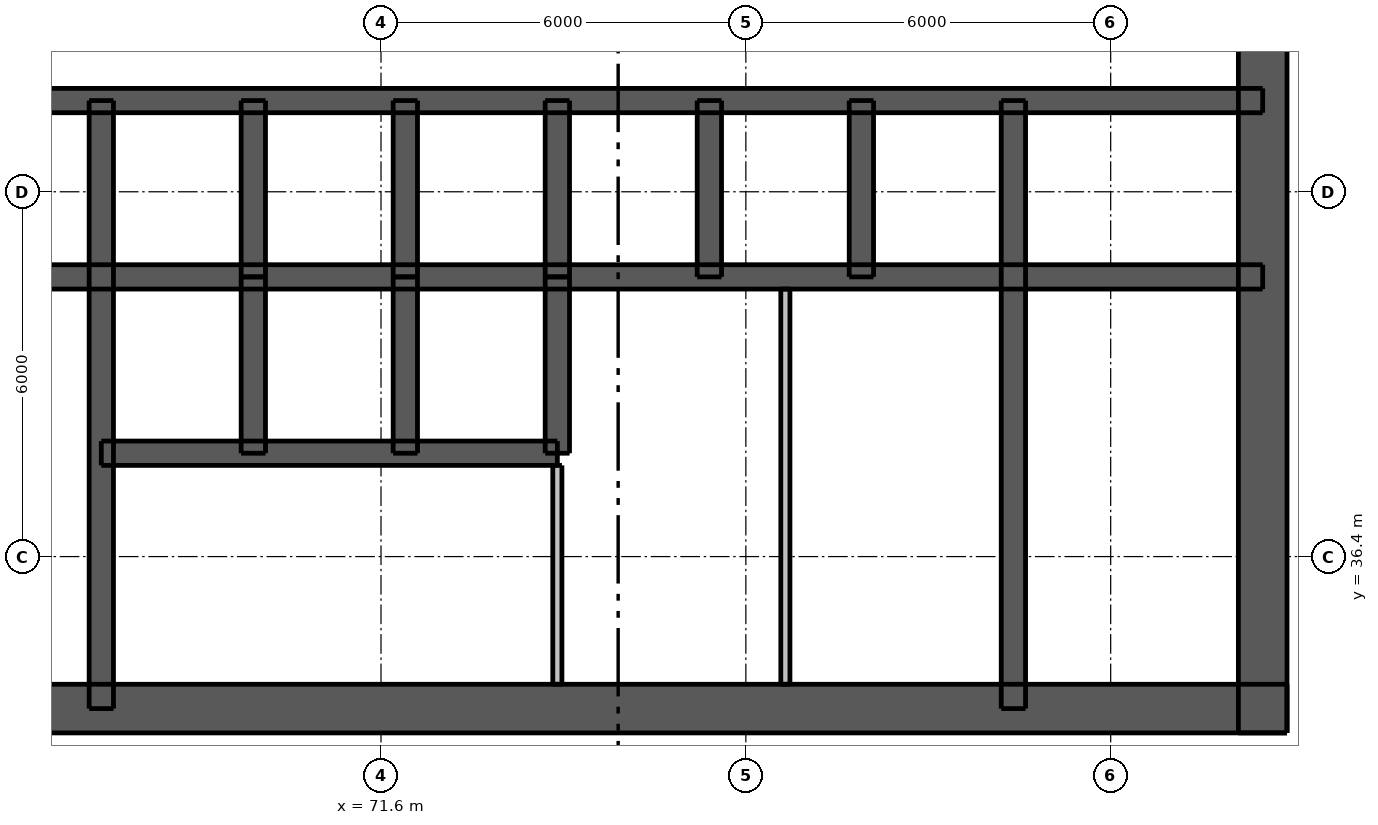
"""IFC4 building model, lengths in metres.
Left out: names, types, materials, properties, quantities, classifications, styles, units other than length and angle.
Written with IfcOpenShell. Run it as: python <this file> out.ifc"""

import sys

from ifc_helpers import new_model, si_unit, direction, frame, frame_2d, origin, place, context, subcontext, project, spatial, rectangle, extrude, element, fill, save


model = new_model("IFC4")
c1 = context("Model", 3, precision=1e-05, world=origin(), true_north=direction((0.0, 1.0)))
c2 = subcontext(c1, "Body", "Model", "MODEL_VIEW")
j1 = project(units=[si_unit("LENGTHUNIT", "METRE"), si_unit("PLANEANGLEUNIT", "RADIAN")], contexts=[c1])
p1 = place(None, origin())
s1 = spatial("IfcSite", under=j1, at=p1, CompositionType="ELEMENT")
p2 = place(p1, origin())
s2 = spatial("IfcBuilding", under=s1, at=p2, CompositionType="ELEMENT")
p3 = place(p2, frame((0.0, 0.0, 88.6)))
s3 = spatial("IfcBuildingStorey", under=s2, at=p3, CompositionType="ELEMENT", Elevation=88.6)
p4 = place(p3, frame((62.5, 33.9, 0.0), z_axis=(0.0, 0.0, 1.0), x_axis=(1.0, 0.0, 0.0)))
e1 = element("IfcWall", 1, at=p4, inside=s3, PredefinedType="SHEAR", context=c2, shape_type="SweptSolid", body=[
    extrude(rectangle(XDim=24.0, YDim=0.8, at=frame_2d((12.0, 0.0))), origin(), (0.0, 0.0, 1.0), 3.05),
])
p5 = place(p4, frame((2.0, 0.0, 0.0)))
e2 = element("IfcOpeningElement", 2, at=p5, cuts=e1, PredefinedType="OPENING", context=c2, shape_type="SweptSolid", body=[
    extrude(rectangle(XDim=1.1, YDim=2.1, at=frame_2d((0.55, 1.05))), frame((0.0, 0.41, 0.0), z_axis=(0.0, -1.0, 0.0), x_axis=(1.0, 0.0, 0.0)), (0.0, 0.0, 1.0), 0.82),
])
p6 = place(p4, frame((20.9, 0.0, 0.0)))
e3 = element("IfcOpeningElement", 3, at=p6, cuts=e1, PredefinedType="OPENING", context=c2, shape_type="SweptSolid", body=[
    extrude(rectangle(XDim=1.1, YDim=2.1, at=frame_2d((0.55, 1.05))), frame((0.0, 0.41, 0.0), z_axis=(0.0, -1.0, 0.0), x_axis=(1.0, 0.0, 0.0)), (0.0, 0.0, 1.0), 0.82),
])
p7 = place(p4, frame((8.0, 0.0, 0.0)))
e4 = element("IfcOpeningElement", 4, at=p7, cuts=e1, PredefinedType="OPENING", context=c2, shape_type="SweptSolid", body=[
    extrude(rectangle(XDim=1.1, YDim=2.1, at=frame_2d((0.55, 1.05))), frame((0.0, 0.41, 0.0), z_axis=(0.0, -1.0, 0.0), x_axis=(1.0, 0.0, 0.0)), (0.0, 0.0, 1.0), 0.82),
])
p8 = place(p4, frame((13.525, 0.0, 0.0)))
e5 = element("IfcOpeningElement", 5, at=p8, cuts=e1, PredefinedType="OPENING", context=c2, shape_type="SweptSolid", body=[
    extrude(rectangle(XDim=0.9, YDim=2.1, at=frame_2d((0.45, 1.05))), frame((0.0, 0.41, 0.0), z_axis=(0.0, -1.0, 0.0), x_axis=(1.0, 0.0, 0.0)), (0.0, 0.0, 1.0), 0.82),
])
p9 = place(p4, frame((17.075, 0.0, 0.0)))
e6 = element("IfcOpeningElement", 6, at=p9, cuts=e1, PredefinedType="OPENING", context=c2, shape_type="SweptSolid", body=[
    extrude(rectangle(XDim=0.9, YDim=2.1, at=frame_2d((0.45, 1.05))), frame((0.0, 0.41, 0.0), z_axis=(0.0, -1.0, 0.0), x_axis=(1.0, 0.0, 0.0)), (0.0, 0.0, 1.0), 0.82),
])
p10 = place(p3, frame((86.1, 33.5, 0.0), z_axis=(0.0, 0.0, 1.0), x_axis=(0.0, 1.0, 0.0)))
e7 = element("IfcWall", 7, at=p10, inside=s3, PredefinedType="SHEAR", context=c2, shape_type="SweptSolid", body=[
    extrude(rectangle(XDim=24.0, YDim=0.8, at=frame_2d((12.0, 0.0))), origin(), (0.0, 0.0, 1.0), 3.05),
])
p11 = place(p10, frame((11.2, 0.0, 0.0)))
e8 = element("IfcOpeningElement", 8, at=p11, cuts=e7, PredefinedType="OPENING", context=c2, shape_type="SweptSolid", body=[
    extrude(rectangle(XDim=1.6, YDim=2.1, at=frame_2d((0.8, 1.05))), frame((0.0, 0.41, 0.0), z_axis=(0.0, -1.0, 0.0), x_axis=(1.0, 0.0, 0.0)), (0.0, 0.0, 1.0), 0.82),
])
p12 = place(p3, frame((62.9, 41.0, 0.0), z_axis=(0.0, 0.0, 1.0), x_axis=(1.0, 0.0, 0.0)))
e9 = element("IfcWall", 9, at=p12, inside=s3, PredefinedType="SHEAR", context=c2, shape_type="SweptSolid", body=[
    extrude(rectangle(XDim=23.2, YDim=0.4, at=frame_2d((11.6, 0.0))), origin(), (0.0, 0.0, 1.0), 3.05),
])
p13 = place(p3, frame((62.9, 43.9, 0.0), z_axis=(0.0, 0.0, 1.0), x_axis=(1.0, 0.0, 0.0)))
e10 = element("IfcWall", 10, at=p13, inside=s3, PredefinedType="SHEAR", context=c2, shape_type="SweptSolid", body=[
    extrude(rectangle(XDim=23.2, YDim=0.4, at=frame_2d((11.6, 0.0))), origin(), (0.0, 0.0, 1.0), 3.05),
])
p14 = place(p13, frame((1.07, 0.0, 0.0)))
e11 = element("IfcOpeningElement", 11, at=p14, cuts=e10, PredefinedType="OPENING", context=c2, shape_type="SweptSolid", body=[
    extrude(rectangle(XDim=0.9, YDim=2.1, at=frame_2d((0.45, 1.05))), frame((0.0, 0.21, 0.0), z_axis=(0.0, -1.0, 0.0), x_axis=(1.0, 0.0, 0.0)), (0.0, 0.0, 1.0), 0.42),
])
p15 = place(p13, frame((2.87, 0.0, 0.0)))
e12 = element("IfcOpeningElement", 12, at=p15, cuts=e10, PredefinedType="OPENING", context=c2, shape_type="SweptSolid", body=[
    extrude(rectangle(XDim=0.8, YDim=2.1, at=frame_2d((0.4, 1.05))), frame((0.0, 0.21, 0.0), z_axis=(0.0, -1.0, 0.0), x_axis=(1.0, 0.0, 0.0)), (0.0, 0.0, 1.0), 0.42),
])
p16 = place(p13, frame((20.6, 0.0, 0.0)))
e13 = element("IfcOpeningElement", 13, at=p16, cuts=e10, PredefinedType="OPENING", context=c2, shape_type="SweptSolid", body=[
    extrude(rectangle(XDim=0.9, YDim=2.1, at=frame_2d((0.45, 1.05))), frame((0.0, 0.21, 0.0), z_axis=(0.0, -1.0, 0.0), x_axis=(1.0, 0.0, 0.0)), (0.0, 0.0, 1.0), 0.42),
])
p17 = place(p13, frame((4.8, 0.0, 0.0)))
e14 = element("IfcOpeningElement", 14, at=p17, cuts=e10, PredefinedType="OPENING", context=c2, shape_type="SweptSolid", body=[
    extrude(rectangle(XDim=1.1, YDim=2.1, at=frame_2d((0.55, 1.05))), frame((0.0, 0.21, 0.0), z_axis=(0.0, -1.0, 0.0), x_axis=(1.0, 0.0, 0.0)), (0.0, 0.0, 1.0), 0.42),
])
p18 = place(p13, frame((7.3, 0.0, 0.0)))
e15 = element("IfcOpeningElement", 15, at=p18, cuts=e10, PredefinedType="OPENING", context=c2, shape_type="SweptSolid", body=[
    extrude(rectangle(XDim=1.1, YDim=2.1, at=frame_2d((0.55, 1.05))), frame((0.0, 0.21, 0.0), z_axis=(0.0, -1.0, 0.0), x_axis=(1.0, 0.0, 0.0)), (0.0, 0.0, 1.0), 0.42),
])
p19 = place(p13, frame((9.8, 0.0, 0.0)))
e16 = element("IfcOpeningElement", 16, at=p19, cuts=e10, PredefinedType="OPENING", context=c2, shape_type="SweptSolid", body=[
    extrude(rectangle(XDim=1.1, YDim=2.1, at=frame_2d((0.55, 1.05))), frame((0.0, 0.21, 0.0), z_axis=(0.0, -1.0, 0.0), x_axis=(1.0, 0.0, 0.0)), (0.0, 0.0, 1.0), 0.42),
])
p20 = place(p13, frame((12.3, 0.0, 0.0)))
e17 = element("IfcOpeningElement", 17, at=p20, cuts=e10, PredefinedType="OPENING", context=c2, shape_type="SweptSolid", body=[
    extrude(rectangle(XDim=1.1, YDim=2.1, at=frame_2d((0.55, 1.05))), frame((0.0, 0.21, 0.0), z_axis=(0.0, -1.0, 0.0), x_axis=(1.0, 0.0, 0.0)), (0.0, 0.0, 1.0), 0.42),
])
p21 = place(p13, frame((14.8, 0.0, 0.0)))
e18 = element("IfcOpeningElement", 18, at=p21, cuts=e10, PredefinedType="OPENING", context=c2, shape_type="SweptSolid", body=[
    extrude(rectangle(XDim=1.1, YDim=2.1, at=frame_2d((0.55, 1.05))), frame((0.0, 0.21, 0.0), z_axis=(0.0, -1.0, 0.0), x_axis=(1.0, 0.0, 0.0)), (0.0, 0.0, 1.0), 0.42),
])
p22 = place(p13, frame((17.3, 0.0, 0.0)))
e19 = element("IfcOpeningElement", 19, at=p22, cuts=e10, PredefinedType="OPENING", context=c2, shape_type="SweptSolid", body=[
    extrude(rectangle(XDim=1.1, YDim=2.1, at=frame_2d((0.55, 1.05))), frame((0.0, 0.21, 0.0), z_axis=(0.0, -1.0, 0.0), x_axis=(1.0, 0.0, 0.0)), (0.0, 0.0, 1.0), 0.42),
])
p23 = place(p3, frame((67.0, 33.9, 0.0), z_axis=(0.0, 0.0, 1.0), x_axis=(0.0, 1.0, 0.0)))
e20 = element("IfcWall", 20, at=p23, inside=s3, PredefinedType="SHEAR", context=c2, shape_type="SweptSolid", body=[
    extrude(rectangle(XDim=10.0, YDim=0.4, at=frame_2d((5.0, 0.0))), origin(), (0.0, 0.0, 1.0), 3.05),
])
p24 = place(p23, frame((0.6, 0.0, 0.0)))
e21 = element("IfcOpeningElement", 21, at=p24, cuts=e20, PredefinedType="OPENING", context=c2, shape_type="SweptSolid", body=[
    extrude(rectangle(XDim=1.1, YDim=2.1, at=frame_2d((0.55, 1.05))), frame((0.0, 0.21, 0.0), z_axis=(0.0, -1.0, 0.0), x_axis=(1.0, 0.0, 0.0)), (0.0, 0.0, 1.0), 0.42),
])
p25 = place(p3, frame((82.0, 33.9, 0.0), z_axis=(0.0, 0.0, 1.0), x_axis=(0.0, 1.0, 0.0)))
e22 = element("IfcWall", 22, at=p25, inside=s3, PredefinedType="SHEAR", context=c2, shape_type="SweptSolid", body=[
    extrude(rectangle(XDim=10.0, YDim=0.4, at=frame_2d((5.0, 0.0))), origin(), (0.0, 0.0, 1.0), 3.05),
])
for number, where, z_axis, x_axis in (
    (23, (69.5, 41.0, 0.0), (0.0, 0.0, 1.0), (0.0, 1.0, 0.0)),
    (24, (72.0, 41.0, 0.0), (0.0, 0.0, 1.0), (0.0, 1.0, 0.0)),
    (25, (74.5, 41.0, 0.0), (0.0, 0.0, 1.0), (0.0, 1.0, 0.0)),
    (26, (77.0, 41.0, 0.0), (0.0, 0.0, 1.0), (0.0, 1.0, 0.0)),
    (27, (79.5, 41.0, 0.0), (0.0, 0.0, 1.0), (0.0, 1.0, 0.0)),
):
    element("IfcWall", number, at=place(p3, frame(where, z_axis=z_axis, x_axis=x_axis)), inside=s3, PredefinedType="SHEAR", context=c2, shape_type="SweptSolid", body=[
        extrude(rectangle(XDim=2.9, YDim=0.4, at=frame_2d((1.45, 0.0))), origin(), (0.0, 0.0, 1.0), 3.05),
    ])
p26 = place(p3, frame((67.0, 38.1, 0.0), z_axis=(0.0, 0.0, 1.0), x_axis=(1.0, 0.0, 0.0)))
e28 = element("IfcWall", 28, at=p26, inside=s3, PredefinedType="SHEAR", context=c2, shape_type="SweptSolid", body=[
    extrude(rectangle(XDim=7.5, YDim=0.4, at=frame_2d((3.75, 0.0))), origin(), (0.0, 0.0, 1.0), 3.05),
])
p27 = place(p26, frame((0.7, 0.0, 0.0)))
e29 = element("IfcOpeningElement", 29, at=p27, cuts=e28, PredefinedType="OPENING", context=c2, shape_type="SweptSolid", body=[
    extrude(rectangle(XDim=1.1, YDim=2.1, at=frame_2d((0.55, 1.05))), frame((0.0, 0.21, 0.0), z_axis=(0.0, -1.0, 0.0), x_axis=(1.0, 0.0, 0.0)), (0.0, 0.0, 1.0), 0.42),
])
p28 = place(p26, frame((3.2, 0.0, 0.0)))
e30 = element("IfcOpeningElement", 30, at=p28, cuts=e28, PredefinedType="OPENING", context=c2, shape_type="SweptSolid", body=[
    extrude(rectangle(XDim=1.1, YDim=2.1, at=frame_2d((0.55, 1.05))), frame((0.0, 0.21, 0.0), z_axis=(0.0, -1.0, 0.0), x_axis=(1.0, 0.0, 0.0)), (0.0, 0.0, 1.0), 0.42),
])
p29 = place(p26, frame((5.65, 0.0, 0.0)))
e31 = element("IfcOpeningElement", 31, at=p29, cuts=e28, PredefinedType="OPENING", context=c2, shape_type="SweptSolid", body=[
    extrude(rectangle(XDim=1.2, YDim=2.1, at=frame_2d((0.6, 1.05))), frame((0.0, 0.21, 0.0), z_axis=(0.0, -1.0, 0.0), x_axis=(1.0, 0.0, 0.0)), (0.0, 0.0, 1.0), 0.42),
])
for number, where, z_axis, x_axis in (
    (32, (69.5, 38.1, 0.0), (0.0, 0.0, 1.0), (0.0, 1.0, 0.0)),
    (33, (72.0, 38.1, 0.0), (0.0, 0.0, 1.0), (0.0, 1.0, 0.0)),
    (34, (74.5, 38.1, 0.0), (0.0, 0.0, 1.0), (0.0, 1.0, 0.0)),
):
    element("IfcWall", number, at=place(p3, frame(where, z_axis=z_axis, x_axis=x_axis)), inside=s3, PredefinedType="SHEAR", context=c2, shape_type="SweptSolid", body=[
        extrude(rectangle(XDim=2.9, YDim=0.4, at=frame_2d((1.45, 0.0))), origin(), (0.0, 0.0, 1.0), 3.05),
    ])
p30 = place(p3, frame((74.5, 34.3, 0.0), z_axis=(0.0, 0.0, 1.0), x_axis=(0.0, 1.0, 0.0)))
e35 = element("IfcWall", 35, at=p30, inside=s3, PredefinedType="PLUMBINGWALL", context=c2, shape_type="SweptSolid", body=[
    extrude(rectangle(XDim=3.6, YDim=0.15, at=frame_2d((1.8, 0.0))), origin(), (0.0, 0.0, 1.0), 3.05),
])
p31 = place(p3, frame((78.25, 34.3, 0.0), z_axis=(0.0, 0.0, 1.0), x_axis=(0.0, 1.0, 0.0)))
e36 = element("IfcWall", 36, at=p31, inside=s3, PredefinedType="PLUMBINGWALL", context=c2, shape_type="SweptSolid", body=[
    extrude(rectangle(XDim=6.5, YDim=0.15, at=frame_2d((3.25, 0.0))), origin(), (0.0, 0.0, 1.0), 3.05),
])
p32 = place(p6, origin())
e37 = element("IfcDoor", 37, at=p32, inside=s3, OperationType="SINGLE_SWING_RIGHT", PredefinedType="DOOR", context=c2, shape_type="SweptSolid", body=[
    extrude(rectangle(XDim=1.1, YDim=2.1, at=frame_2d((0.55, 1.05))), frame((0.0, 0.388, 0.0), z_axis=(0.0, -1.0, 0.0), x_axis=(1.0, 0.0, 0.0)), (0.0, 0.0, 1.0), 0.05),
])
fill(e3, e37)
p33 = place(p7, origin())
e38 = element("IfcDoor", 38, at=p33, inside=s3, OperationType="SINGLE_SWING_LEFT", PredefinedType="DOOR", context=c2, shape_type="SweptSolid", body=[
    extrude(rectangle(XDim=1.1, YDim=2.1, at=frame_2d((0.55, 1.05))), frame((0.0, 0.388, 0.0), z_axis=(0.0, -1.0, 0.0), x_axis=(1.0, 0.0, 0.0)), (0.0, 0.0, 1.0), 0.05),
])
fill(e4, e38)
p34 = place(p24, origin())
e39 = element("IfcDoor", 39, at=p34, inside=s3, OperationType="SINGLE_SWING_RIGHT", PredefinedType="DOOR", context=c2, shape_type="SweptSolid", body=[
    extrude(rectangle(XDim=1.1, YDim=2.1, at=frame_2d((0.55, 1.05))), frame((0.0, -0.138, 0.0), z_axis=(0.0, -1.0, 0.0), x_axis=(1.0, 0.0, 0.0)), (0.0, 0.0, 1.0), 0.05),
])
fill(e21, e39)
p35 = place(p8, origin())
e40 = element("IfcDoor", 40, at=p35, inside=s3, OperationType="SINGLE_SWING_LEFT", PredefinedType="DOOR", context=c2, shape_type="SweptSolid", body=[
    extrude(rectangle(XDim=0.9, YDim=2.1, at=frame_2d((0.45, 1.05))), frame((0.0, 0.388, 0.0), z_axis=(0.0, -1.0, 0.0), x_axis=(1.0, 0.0, 0.0)), (0.0, 0.0, 1.0), 0.05),
])
fill(e5, e40)
p36 = place(p9, origin())
e41 = element("IfcDoor", 41, at=p36, inside=s3, OperationType="SINGLE_SWING_LEFT", PredefinedType="DOOR", context=c2, shape_type="SweptSolid", body=[
    extrude(rectangle(XDim=0.9, YDim=2.1, at=frame_2d((0.45, 1.05))), frame((0.0, 0.388, 0.0), z_axis=(0.0, -1.0, 0.0), x_axis=(1.0, 0.0, 0.0)), (0.0, 0.0, 1.0), 0.05),
])
fill(e6, e41)
p37 = place(p15, origin())
e42 = element("IfcDoor", 42, at=p37, inside=s3, OperationType="SINGLE_SWING_RIGHT", PredefinedType="DOOR", context=c2, shape_type="SweptSolid", body=[
    extrude(rectangle(XDim=0.8, YDim=2.1, at=frame_2d((0.4, 1.05))), frame((0.0, -0.138, 0.0), z_axis=(0.0, -1.0, 0.0), x_axis=(1.0, 0.0, 0.0)), (0.0, 0.0, 1.0), 0.05),
])
fill(e12, e42)
p38 = place(p16, origin())
e43 = element("IfcDoor", 43, at=p38, inside=s3, OperationType="SINGLE_SWING_LEFT", PredefinedType="DOOR", context=c2, shape_type="SweptSolid", body=[
    extrude(rectangle(XDim=0.9, YDim=2.1, at=frame_2d((0.45, 1.05))), frame((0.0, -0.138, 0.0), z_axis=(0.0, -1.0, 0.0), x_axis=(1.0, 0.0, 0.0)), (0.0, 0.0, 1.0), 0.05),
])
fill(e13, e43)
p39 = place(p17, origin())
e44 = element("IfcDoor", 44, at=p39, inside=s3, OperationType="DOUBLE_DOOR_SLIDING", PredefinedType="DOOR", context=c2, shape_type="SweptSolid", body=[
    extrude(rectangle(XDim=1.1, YDim=2.1, at=frame_2d((0.55, 1.05))), frame((0.0, 0.025, 0.0), z_axis=(0.0, -1.0, 0.0), x_axis=(1.0, 0.0, 0.0)), (0.0, 0.0, 1.0), 0.05),
])
fill(e14, e44)
p40 = place(p18, origin())
e45 = element("IfcDoor", 45, at=p40, inside=s3, OperationType="DOUBLE_DOOR_SLIDING", PredefinedType="DOOR", context=c2, shape_type="SweptSolid", body=[
    extrude(rectangle(XDim=1.1, YDim=2.1, at=frame_2d((0.55, 1.05))), frame((0.0, 0.025, 0.0), z_axis=(0.0, -1.0, 0.0), x_axis=(1.0, 0.0, 0.0)), (0.0, 0.0, 1.0), 0.05),
])
fill(e15, e45)
p41 = place(p19, origin())
e46 = element("IfcDoor", 46, at=p41, inside=s3, OperationType="DOUBLE_DOOR_SLIDING", PredefinedType="DOOR", context=c2, shape_type="SweptSolid", body=[
    extrude(rectangle(XDim=1.1, YDim=2.1, at=frame_2d((0.55, 1.05))), frame((0.0, 0.025, 0.0), z_axis=(0.0, -1.0, 0.0), x_axis=(1.0, 0.0, 0.0)), (0.0, 0.0, 1.0), 0.05),
])
fill(e16, e46)
p42 = place(p20, origin())
e47 = element("IfcDoor", 47, at=p42, inside=s3, OperationType="DOUBLE_DOOR_SLIDING", PredefinedType="DOOR", context=c2, shape_type="SweptSolid", body=[
    extrude(rectangle(XDim=1.1, YDim=2.1, at=frame_2d((0.55, 1.05))), frame((0.0, 0.025, 0.0), z_axis=(0.0, -1.0, 0.0), x_axis=(1.0, 0.0, 0.0)), (0.0, 0.0, 1.0), 0.05),
])
fill(e17, e47)
p43 = place(p21, origin())
e48 = element("IfcDoor", 48, at=p43, inside=s3, OperationType="DOUBLE_DOOR_SLIDING", PredefinedType="DOOR", context=c2, shape_type="SweptSolid", body=[
    extrude(rectangle(XDim=1.1, YDim=2.1, at=frame_2d((0.55, 1.05))), frame((0.0, 0.025, 0.0), z_axis=(0.0, -1.0, 0.0), x_axis=(1.0, 0.0, 0.0)), (0.0, 0.0, 1.0), 0.05),
])
fill(e18, e48)
p44 = place(p22, origin())
e49 = element("IfcDoor", 49, at=p44, inside=s3, OperationType="DOUBLE_DOOR_SLIDING", PredefinedType="DOOR", context=c2, shape_type="SweptSolid", body=[
    extrude(rectangle(XDim=1.1, YDim=2.1, at=frame_2d((0.55, 1.05))), frame((0.0, 0.025, 0.0), z_axis=(0.0, -1.0, 0.0), x_axis=(1.0, 0.0, 0.0)), (0.0, 0.0, 1.0), 0.05),
])
fill(e19, e49)
p45 = place(p27, origin())
e50 = element("IfcDoor", 50, at=p45, inside=s3, OperationType="DOUBLE_DOOR_SLIDING", PredefinedType="DOOR", context=c2, shape_type="SweptSolid", body=[
    extrude(rectangle(XDim=1.1, YDim=2.1, at=frame_2d((0.55, 1.05))), frame((0.0, 0.025, 0.0), z_axis=(0.0, -1.0, 0.0), x_axis=(1.0, 0.0, 0.0)), (0.0, 0.0, 1.0), 0.05),
])
fill(e29, e50)
p46 = place(p28, origin())
e51 = element("IfcDoor", 51, at=p46, inside=s3, OperationType="DOUBLE_DOOR_SLIDING", PredefinedType="DOOR", context=c2, shape_type="SweptSolid", body=[
    extrude(rectangle(XDim=1.1, YDim=2.1, at=frame_2d((0.55, 1.05))), frame((0.0, 0.025, 0.0), z_axis=(0.0, -1.0, 0.0), x_axis=(1.0, 0.0, 0.0)), (0.0, 0.0, 1.0), 0.05),
])
fill(e30, e51)
p47 = place(p29, origin())
e52 = element("IfcDoor", 52, at=p47, inside=s3, OperationType="DOUBLE_DOOR_SLIDING", PredefinedType="DOOR", context=c2, shape_type="SweptSolid", body=[
    extrude(rectangle(XDim=1.2, YDim=2.1, at=frame_2d((0.6, 1.05))), frame((0.0, 0.025, 0.0), z_axis=(0.0, -1.0, 0.0), x_axis=(1.0, 0.0, 0.0)), (0.0, 0.0, 1.0), 0.05),
])
fill(e31, e52)
save(model, sys.argv[1])
